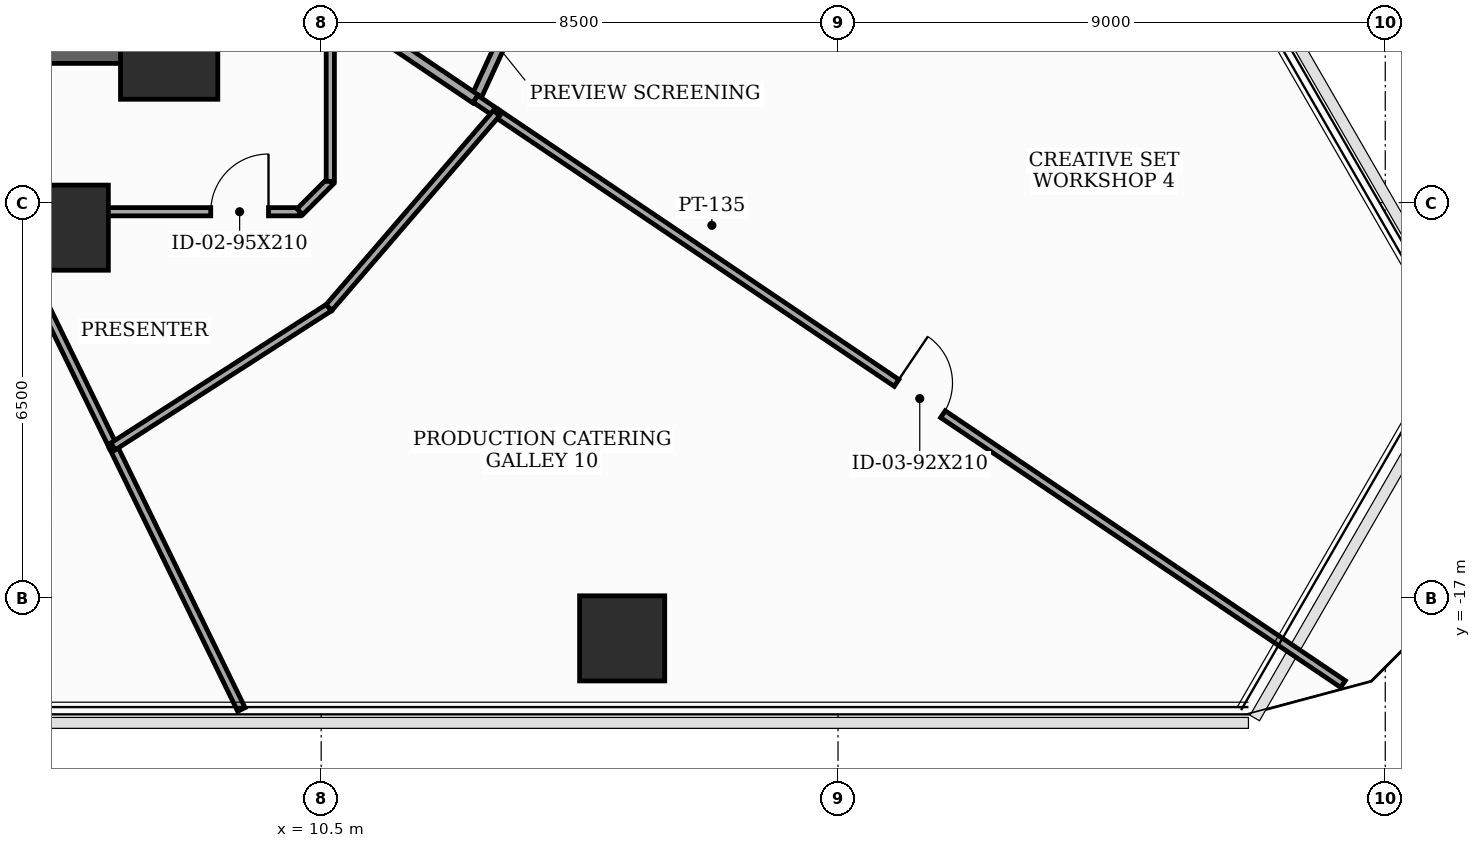
"""IFC4 building model, lengths in metres.
Left out: names, types, materials, properties, quantities, classifications, styles, units other than length and angle.
Written with IfcOpenShell. Run it as: python <this file> out.ifc"""

import sys

from ifc_helpers import new_model, si_unit, direction, frame, frame_2d, origin, origin_2d, place, context, subcontext, project, spatial, rectangle, extrude, element, fill, save


model = new_model("IFC4")
c1 = context("Model", 3, precision=1e-05, world=origin(), true_north=direction((0.0, 1.0)))
c2 = subcontext(c1, "Body", "Model", "MODEL_VIEW")
j1 = project(units=[si_unit("LENGTHUNIT", "METRE"), si_unit("PLANEANGLEUNIT", "RADIAN")], contexts=[c1])
p1 = place(None, origin())
s1 = spatial("IfcSite", under=j1, at=p1, CompositionType="ELEMENT")
p2 = place(p1, origin())
s2 = spatial("IfcBuilding", under=s1, at=p2, CompositionType="ELEMENT")
p3 = place(p2, frame((0.0, 0.0, 37.1)))
s3 = spatial("IfcBuildingStorey", under=s2, at=p3, CompositionType="ELEMENT", Elevation=37.1)
p4 = place(p3, frame((8.0, -8.0, 0.0), z_axis=(0.0, 0.0, 1.0), x_axis=(1.0, 0.0, 0.0)))
e1 = element("IfcColumn", 1, at=p4, inside=s3, PredefinedType="COLUMN", context=c2, shape_type="SweptSolid", body=[
    extrude(rectangle(XDim=1.6, YDim=1.6, at=origin_2d()), origin(), (0.0, 0.0, 1.0), 3.7),
])
for number, where, z_axis, x_axis in (
    (2, (6.3, -10.912, 0.0), (0.0, 0.0, 1.0), (1.0, 0.0, 0.0)),
    (3, (15.45, -17.667, 0.0), (0.0, 0.0, 1.0), (1.0, 0.0, 0.0)),
):
    element("IfcColumn", number, at=place(p3, frame(where, z_axis=z_axis, x_axis=x_axis)), inside=s3, PredefinedType="COLUMN", context=c2, shape_type="SweptSolid", body=[
        extrude(rectangle(XDim=1.4, YDim=1.4, at=origin_2d()), origin(), (0.0, 0.0, 1.0), 3.7),
    ])
p5 = place(p3, frame((-8.0, -8.0, 0.0), z_axis=(0.0, 0.0, 1.0), x_axis=(1.0, 0.0, 0.0)))
e4 = element("IfcWall", 4, at=p5, inside=s3, PredefinedType="SHEAR", context=c2, shape_type="SweptSolid", body=[
    extrude(rectangle(XDim=16.0, YDim=0.42, at=frame_2d((8.0, 0.0))), origin(), (0.0, 0.0, 1.0), 3.5),
])
p6 = place(p5, frame((5.2, 0.0, 0.0)))
e5 = element("IfcOpeningElement", 5, at=p6, cuts=e4, PredefinedType="OPENING", context=c2, shape_type="SweptSolid", body=[
    extrude(rectangle(XDim=0.95, YDim=2.1, at=frame_2d((0.475, 1.05))), frame((0.0, 0.22, 0.0), z_axis=(0.0, -1.0, 0.0), x_axis=(1.0, 0.0, 0.0)), (0.0, 0.0, 1.0), 0.44),
])
p7 = place(p5, frame((9.8, 0.0, 0.0)))
e6 = element("IfcOpeningElement", 6, at=p7, cuts=e4, PredefinedType="OPENING", context=c2, shape_type="SweptSolid", body=[
    extrude(rectangle(XDim=0.95, YDim=2.1, at=frame_2d((0.475, 1.05))), frame((0.0, 0.22, 0.0), z_axis=(0.0, -1.0, 0.0), x_axis=(1.0, 0.0, 0.0)), (0.0, 0.0, 1.0), 0.44),
])
p8 = place(p3, frame((5.194, -10.65, 0.0), z_axis=(0.0, 0.0, 1.0), x_axis=(1.0, 0.0, 0.0)))
e7 = element("IfcWall", 7, at=p8, inside=s3, PredefinedType="PARTITIONING", context=c2, shape_type="SweptSolid", body=[
    extrude(rectangle(XDim=4.956, YDim=0.135, at=frame_2d((2.478, 0.0))), origin(), (0.0, 0.0, 1.0), 2.785),
])
p9 = place(p8, frame((3.49, 0.0, 0.0)))
e8 = element("IfcOpeningElement", 8, at=p9, cuts=e7, PredefinedType="OPENING", context=c2, shape_type="SweptSolid", body=[
    extrude(rectangle(XDim=0.95, YDim=2.1, at=frame_2d((0.475, 1.05))), frame((0.0, 0.077, 0.0), z_axis=(0.0, -1.0, 0.0), x_axis=(1.0, 0.0, 0.0)), (0.0, 0.0, 1.0), 0.155),
])
p10 = place(p3, frame((10.15, -10.65, 0.0), z_axis=(0.0, 0.0, 1.0), x_axis=(0.707106781187, 0.707106781187, 0.0)))
e9 = element("IfcWall", 9, at=p10, inside=s3, PredefinedType="PARTITIONING", context=c2, shape_type="SweptSolid", body=[
    extrude(rectangle(XDim=0.707, YDim=0.135, at=frame_2d((0.354, 0.0))), origin(), (0.0, 0.0, 1.0), 3.5),
])
p11 = place(p3, frame((10.65, -10.15, 0.0), z_axis=(0.0, 0.0, 1.0), x_axis=(0.0, 1.0, 0.0)))
e10 = element("IfcWall", 10, at=p11, inside=s3, PredefinedType="PARTITIONING", context=c2, shape_type="SweptSolid", body=[
    extrude(rectangle(XDim=2.966, YDim=0.135, at=frame_2d((1.483, 0.0))), origin(), (0.0, 0.0, 1.0), 3.5),
])
p12 = place(p3, frame((13.038, -8.794, 0.0), z_axis=(0.0, 0.0, 1.0), x_axis=(0.417322480709, 0.908758464662, 0.0)))
e11 = element("IfcWall", 11, at=p12, inside=s3, PredefinedType="PARTITIONING", context=c2, shape_type="SweptSolid", body=[
    extrude(rectangle(XDim=4.078, YDim=0.16, at=frame_2d((2.039, 0.0))), origin(), (0.0, 0.0, 1.0), 3.5),
])
p13 = place(p3, frame((10.65, -7.184, 0.0), z_axis=(0.0, 0.0, 1.0), x_axis=(0.829196392101, -0.558957371654, 0.0)))
e12 = element("IfcWall", 12, at=p13, inside=s3, PredefinedType="PARTITIONING", context=c2, shape_type="SweptSolid", body=[
    extrude(rectangle(XDim=2.88, YDim=0.16, at=frame_2d((1.44, 0.0))), origin(), (0.0, 0.0, 1.0), 3.5),
])
p14 = place(p3, frame((13.038, -8.794, 0.0), z_axis=(0.0, 0.0, 1.0), x_axis=(0.828163729679, -0.560486250361, 0.0)))
e13 = element("IfcWall", 13, at=p14, inside=s3, PredefinedType="PARTITIONING", context=c2, shape_type="SweptSolid", body=[
    extrude(rectangle(XDim=0.418, YDim=0.135, at=frame_2d((0.209, 0.0))), origin(), (0.0, 0.0, 1.0), 3.5),
])
p15 = place(p3, frame((13.384, -9.028, 0.0), z_axis=(0.0, 0.0, 1.0), x_axis=(0.829042972493, -0.55918489765, 0.0)))
e14 = element("IfcWall", 14, at=p15, inside=s3, PredefinedType="PARTITIONING", context=c2, shape_type="SweptSolid", body=[
    extrude(rectangle(XDim=16.791, YDim=0.135, at=frame_2d((8.396, 0.0))), origin(), (0.0, 0.0, 1.0), 2.935),
])
p16 = place(p15, frame((7.936, 0.0, 0.0)))
e15 = element("IfcOpeningElement", 15, at=p16, cuts=e14, PredefinedType="OPENING", context=c2, shape_type="SweptSolid", body=[
    extrude(rectangle(XDim=0.92, YDim=2.1, at=frame_2d((0.46, 1.05))), frame((0.0, 0.077, 0.0), z_axis=(0.0, -1.0, 0.0), x_axis=(1.0, 0.0, 0.0)), (0.0, 0.0, 1.0), 0.155),
])
p17 = place(p3, frame((7.077, -14.51, 0.0), z_axis=(0.0, 0.0, 1.0), x_axis=(-0.438392272504, 0.898783742292, 0.0)))
e16 = element("IfcWall", 16, at=p17, inside=s3, PredefinedType="PARTITIONING", context=c2, shape_type="SweptSolid", body=[
    extrude(rectangle(XDim=4.295, YDim=0.135, at=frame_2d((2.147, 0.0))), origin(), (0.0, 0.0, 1.0), 2.685),
])
p18 = place(p3, frame((9.188, -18.837, 0.0), z_axis=(0.0, 0.0, 1.0), x_axis=(-0.438408644876, 0.898775756292, 0.0)))
e17 = element("IfcWall", 17, at=p18, inside=s3, PredefinedType="PARTITIONING", context=c2, shape_type="SweptSolid", body=[
    extrude(rectangle(XDim=4.814, YDim=0.135, at=frame_2d((2.407, 0.0))), origin(), (0.0, 0.0, 1.0), 2.935),
])
p19 = place(p3, frame((7.077, -14.51, 0.0), z_axis=(0.0, 0.0, 1.0), x_axis=(0.841056333741, 0.540947542258, 0.0)))
e18 = element("IfcWall", 18, at=p19, inside=s3, PredefinedType="PARTITIONING", context=c2, shape_type="SweptSolid", body=[
    extrude(rectangle(XDim=4.222, YDim=0.135, at=frame_2d((2.111, 0.0))), origin(), (0.0, 0.0, 1.0), 2.685),
])
p20 = place(p3, frame((10.628, -12.226, 0.0), z_axis=(0.0, 0.0, 1.0), x_axis=(0.652832083446, 0.757502654004, 0.0)))
e19 = element("IfcWall", 19, at=p20, inside=s3, PredefinedType="PARTITIONING", context=c2, shape_type="SweptSolid", body=[
    extrude(rectangle(XDim=4.222, YDim=0.135, at=frame_2d((2.111, 0.0))), origin(), (0.0, 0.0, 1.0), 3.5),
])
p21 = place(p9, origin())
e20 = element("IfcDoor", 20, at=p21, inside=s3, OperationType="SINGLE_SWING_RIGHT", PredefinedType="DOOR", context=c2, shape_type="SweptSolid", body=[
    extrude(rectangle(XDim=0.95, YDim=2.1, at=frame_2d((0.475, 1.05))), frame((0.0, 0.025, 0.0), z_axis=(0.0, -1.0, 0.0), x_axis=(1.0, 0.0, 0.0)), (0.0, 0.0, 1.0), 0.05),
])
fill(e8, e20)
p22 = place(p16, origin())
e21 = element("IfcDoor", 21, at=p22, inside=s3, OperationType="SINGLE_SWING_LEFT", PredefinedType="DOOR", context=c2, shape_type="SweptSolid", body=[
    extrude(rectangle(XDim=0.92, YDim=2.1, at=frame_2d((0.46, 1.05))), frame((0.0, 0.025, 0.0), z_axis=(0.0, -1.0, 0.0), x_axis=(1.0, 0.0, 0.0)), (0.0, 0.0, 1.0), 0.05),
])
fill(e15, e21)
save(model, sys.argv[1])
